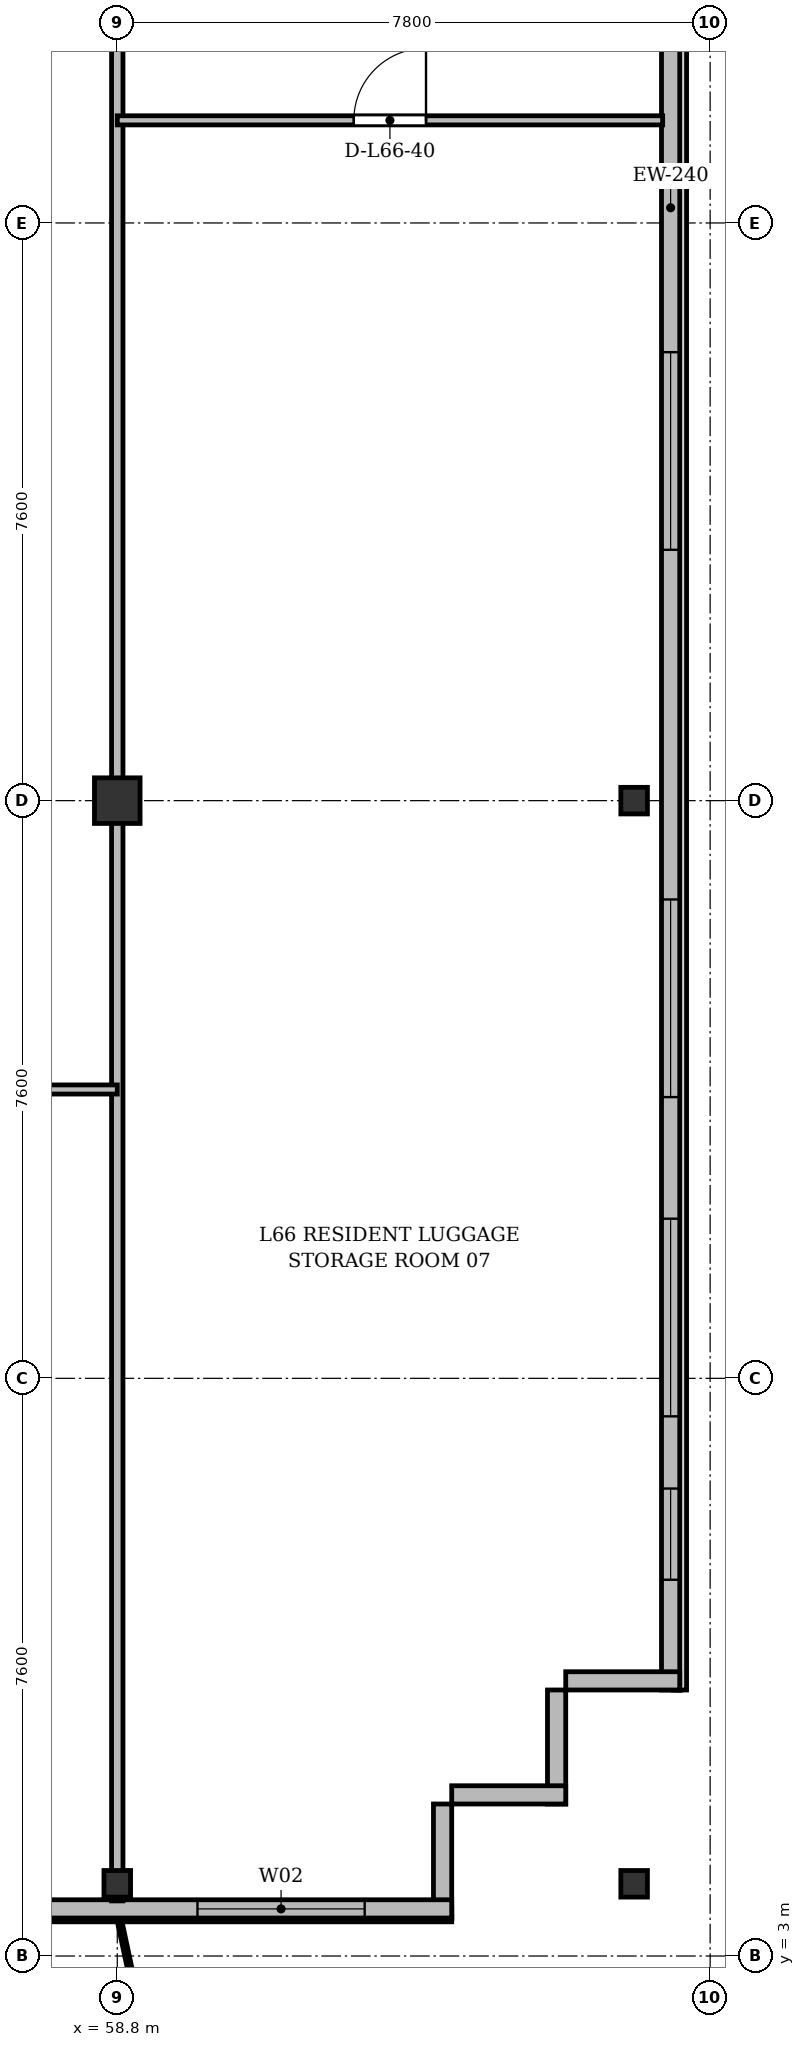
"""IFC4 building model, lengths in metres.
Left out: names, types, materials, properties, quantities, classifications, styles, units other than length and angle.
Written with IfcOpenShell. Run it as: python <this file> out.ifc"""

import sys

from ifc_helpers import new_model, si_unit, direction, frame, frame_2d, origin, origin_2d, place, context, subcontext, project, spatial, rectangle, i_section, extrude, source, transform, mapped, element, fill, save


model = new_model("IFC4")
c1 = context("Model", 3, precision=1e-05, world=origin(), true_north=direction((0.0, 1.0)))
c2 = subcontext(c1, "Body", "Model", "MODEL_VIEW")
j1 = project(units=[si_unit("LENGTHUNIT", "METRE"), si_unit("PLANEANGLEUNIT", "RADIAN")], contexts=[c1])
p1 = place(None, origin())
s1 = spatial("IfcSite", under=j1, at=p1, CompositionType="ELEMENT")
p2 = place(p1, origin())
s2 = spatial("IfcBuilding", under=s1, at=p2, CompositionType="ELEMENT")
p3 = place(p2, frame((0.0, 0.0, 255.9)))
s3 = spatial("IfcBuildingStorey", under=s2, at=p3, CompositionType="ELEMENT", Elevation=255.9)
m1 = source(origin(), c2, "Body", "SweptSolid", [
    extrude(i_section(OverallWidth=0.35, OverallDepth=0.35, WebThickness=0.018, FlangeThickness=0.028, at=origin_2d()), origin(), (0.0, 0.0, 1.0), 3.6),
])
p4 = place(p3, frame((58.8, 3.95, 0.0), z_axis=(0.0, 0.0, 1.0), x_axis=(1.0, 0.0, 0.0)))
e1 = element("IfcColumn", 1, at=p4, inside=s3, PredefinedType="COLUMN", context=c2, shape_type="MappedRepresentation", body=[
    mapped(m1, transform((0.0, 0.0, 0.0), x_axis=(1.0, 0.0, 0.0), y_axis=(0.0, 1.0, 0.0), z_axis=(0.0, 0.0, 1.0), scale=1.0)),
])
m2 = source(origin(), c2, "Body", "SweptSolid", [
    extrude(rectangle(XDim=0.6, YDim=0.6, at=origin_2d()), origin(), (0.0, 0.0, 1.0), 3.6),
])
p5 = place(p3, frame((58.8, 18.2, 0.0), z_axis=(0.0, 0.0, 1.0), x_axis=(1.0, 0.0, 0.0)))
e2 = element("IfcColumn", 2, at=p5, inside=s3, PredefinedType="COLUMN", context=c2, shape_type="MappedRepresentation", body=[
    mapped(m2, transform((0.0, 0.0, 0.0), x_axis=(1.0, 0.0, 0.0), y_axis=(0.0, 1.0, 0.0), z_axis=(0.0, 0.0, 1.0), scale=1.0)),
])
for number, where, z_axis, x_axis in (
    (3, (65.6, 3.95, 0.0), (0.0, 0.0, 1.0), (1.0, 0.0, 0.0)),
    (4, (65.6, 18.2, 0.0), (0.0, 0.0, 1.0), (1.0, 0.0, 0.0)),
):
    element("IfcColumn", number, at=place(p3, frame(where, z_axis=z_axis, x_axis=x_axis)), inside=s3, PredefinedType="COLUMN", context=c2, shape_type="MappedRepresentation", body=[
        mapped(m1, transform((0.0, 0.0, 0.0), x_axis=(1.0, 0.0, 0.0), y_axis=(0.0, 1.0, 0.0), z_axis=(0.0, 0.0, 1.0), scale=1.0)),
    ])
p6 = place(p3, frame((66.08, 45.5, 0.0), z_axis=(0.0, 0.0, 1.0), x_axis=(0.0, -1.0, 0.0)))
e5 = element("IfcWall", 5, at=p6, inside=s3, PredefinedType="SOLIDWALL", context=c2, shape_type="SweptSolid", body=[
    extrude(rectangle(XDim=39.0, YDim=0.24, at=frame_2d((19.5, 0.0))), origin(), (0.0, 0.0, 1.0), 3.37),
])
p7 = place(p6, frame((36.35, 0.0, 0.92)))
e6 = element("IfcOpeningElement", 6, at=p7, cuts=e5, PredefinedType="OPENING", context=c2, shape_type="SweptSolid", body=[
    extrude(rectangle(XDim=1.2, YDim=1.65, at=frame_2d((0.6, 0.825))), frame((0.0, 0.13, 0.0), z_axis=(0.0, -1.0, 0.0), x_axis=(1.0, 0.0, 0.0)), (0.0, 0.0, 1.0), 0.26),
])
p8 = place(p6, frame((32.8, 0.0, 0.92)))
e7 = element("IfcOpeningElement", 7, at=p8, cuts=e5, PredefinedType="OPENING", context=c2, shape_type="SweptSolid", body=[
    extrude(rectangle(XDim=2.6, YDim=1.9, at=frame_2d((1.3, 0.95))), frame((0.0, 0.13, 0.0), z_axis=(0.0, -1.0, 0.0), x_axis=(1.0, 0.0, 0.0)), (0.0, 0.0, 1.0), 0.26),
])
p9 = place(p6, frame((28.6, 0.0, 0.92)))
e8 = element("IfcOpeningElement", 8, at=p9, cuts=e5, PredefinedType="OPENING", context=c2, shape_type="SweptSolid", body=[
    extrude(rectangle(XDim=2.6, YDim=1.9, at=frame_2d((1.3, 0.95))), frame((0.0, 0.13, 0.0), z_axis=(0.0, -1.0, 0.0), x_axis=(1.0, 0.0, 0.0)), (0.0, 0.0, 1.0), 0.26),
])
p10 = place(p6, frame((21.4, 0.0, 0.92)))
e9 = element("IfcOpeningElement", 9, at=p10, cuts=e5, PredefinedType="OPENING", context=c2, shape_type="SweptSolid", body=[
    extrude(rectangle(XDim=2.6, YDim=1.9, at=frame_2d((1.3, 0.95))), frame((0.0, 0.13, 0.0), z_axis=(0.0, -1.0, 0.0), x_axis=(1.0, 0.0, 0.0)), (0.0, 0.0, 1.0), 0.26),
])
p11 = place(p6, frame((7.4, 0.0, 0.92)))
e10 = element("IfcOpeningElement", 10, at=p11, cuts=e5, PredefinedType="OPENING", context=c2, shape_type="SweptSolid", body=[
    extrude(rectangle(XDim=2.6, YDim=1.9, at=frame_2d((1.3, 0.95))), frame((0.0, 0.13, 0.0), z_axis=(0.0, -1.0, 0.0), x_axis=(1.0, 0.0, 0.0)), (0.0, 0.0, 1.0), 0.26),
])
p12 = place(p6, frame((4.5, 0.0, 0.92)))
e11 = element("IfcOpeningElement", 11, at=p12, cuts=e5, PredefinedType="OPENING", context=c2, shape_type="SweptSolid", body=[
    extrude(rectangle(XDim=1.2, YDim=1.65, at=frame_2d((0.6, 0.825))), frame((0.0, 0.13, 0.0), z_axis=(0.0, -1.0, 0.0), x_axis=(1.0, 0.0, 0.0)), (0.0, 0.0, 1.0), 0.26),
])
p13 = place(p6, frame((1.15, 0.0, 0.92)))
e12 = element("IfcOpeningElement", 12, at=p13, cuts=e5, PredefinedType="OPENING", context=c2, shape_type="SweptSolid", body=[
    extrude(rectangle(XDim=1.2, YDim=1.65, at=frame_2d((0.6, 0.825))), frame((0.0, 0.13, 0.0), z_axis=(0.0, -1.0, 0.0), x_axis=(1.0, 0.0, 0.0)), (0.0, 0.0, 1.0), 0.26),
])
p14 = place(p3, frame((66.2, 6.62, 0.0), z_axis=(0.0, 0.0, 1.0), x_axis=(-1.0, 0.0, 0.0)))
e13 = element("IfcWall", 13, at=p14, inside=s3, PredefinedType="SOLIDWALL", context=c2, shape_type="SweptSolid", body=[
    extrude(rectangle(XDim=1.5, YDim=0.24, at=frame_2d((0.75, 0.0))), origin(), (0.0, 0.0, 1.0), 2.87),
])
for number, where, z_axis, x_axis in (
    (14, (64.58, 6.5, 0.0), (0.0, 0.0, 1.0), (0.0, -1.0, 0.0)),
    (15, (64.7, 5.12, 0.0), (0.0, 0.0, 1.0), (-1.0, 0.0, 0.0)),
):
    element("IfcWall", number, at=place(p3, frame(where, z_axis=z_axis, x_axis=x_axis)), inside=s3, PredefinedType="SOLIDWALL", context=c2, shape_type="SweptSolid", body=[
        extrude(rectangle(XDim=1.5, YDim=0.24, at=frame_2d((0.75, 0.0))), origin(), (0.0, 0.0, 1.0), 3.37),
    ])
p15 = place(p3, frame((63.08, 5.0, 0.0), z_axis=(0.0, 0.0, 1.0), x_axis=(0.0, -1.0, 0.0)))
e16 = element("IfcWall", 16, at=p15, inside=s3, PredefinedType="SOLIDWALL", context=c2, shape_type="SweptSolid", body=[
    extrude(rectangle(XDim=1.5, YDim=0.24, at=frame_2d((0.75, 0.0))), origin(), (0.0, 0.0, 1.0), 2.92),
])
p16 = place(p3, frame((63.2, 3.62, 0.0), z_axis=(0.0, 0.0, 1.0), x_axis=(-1.0, 0.0, 0.0)))
e17 = element("IfcWall", 17, at=p16, inside=s3, PredefinedType="SOLIDWALL", context=c2, shape_type="SweptSolid", body=[
    extrude(rectangle(XDim=52.0, YDim=0.24, at=frame_2d((26.0, 0.0))), origin(), (0.0, 0.0, 1.0), 3.37),
])
p17 = place(p16, frame((1.145, 0.0, 0.9)))
e18 = element("IfcOpeningElement", 18, at=p17, cuts=e17, PredefinedType="OPENING", context=c2, shape_type="SweptSolid", body=[
    extrude(rectangle(XDim=2.2, YDim=1.8, at=frame_2d((1.1, 0.9))), frame((0.0, 0.13, 0.0), z_axis=(0.0, -1.0, 0.0), x_axis=(1.0, 0.0, 0.0)), (0.0, 0.0, 1.0), 0.26),
])
p18 = place(p16, frame((7.55, 0.0, 0.9)))
e19 = element("IfcOpeningElement", 19, at=p18, cuts=e17, PredefinedType="OPENING", context=c2, shape_type="SweptSolid", body=[
    extrude(rectangle(XDim=1.5, YDim=1.75, at=frame_2d((0.75, 0.875))), frame((0.0, 0.13, 0.0), z_axis=(0.0, -1.0, 0.0), x_axis=(1.0, 0.0, 0.0)), (0.0, 0.0, 1.0), 0.26),
])
p19 = place(p16, frame((14.017, 0.0, 0.0)))
e20 = element("IfcOpeningElement", 20, at=p19, cuts=e17, PredefinedType="OPENING", context=c2, shape_type="SweptSolid", body=[
    extrude(rectangle(XDim=1.2, YDim=2.2, at=frame_2d((0.6, 1.1))), frame((0.0, 0.13, 0.0), z_axis=(0.0, -1.0, 0.0), x_axis=(1.0, 0.0, 0.0)), (0.0, 0.0, 1.0), 0.26),
])
p20 = place(p16, frame((25.175, 0.0, 0.9)))
e21 = element("IfcOpeningElement", 21, at=p20, cuts=e17, PredefinedType="OPENING", context=c2, shape_type="SweptSolid", body=[
    extrude(rectangle(XDim=1.65, YDim=1.85, at=frame_2d((0.825, 0.925))), frame((0.0, 0.13, 0.0), z_axis=(0.0, -1.0, 0.0), x_axis=(1.0, 0.0, 0.0)), (0.0, 0.0, 1.0), 0.26),
])
p21 = place(p16, frame((35.3, 0.0, 0.9)))
e22 = element("IfcOpeningElement", 22, at=p21, cuts=e17, PredefinedType="OPENING", context=c2, shape_type="SweptSolid", body=[
    extrude(rectangle(XDim=1.8, YDim=1.8, at=frame_2d((0.9, 0.9))), frame((0.0, 0.13, 0.0), z_axis=(0.0, -1.0, 0.0), x_axis=(1.0, 0.0, 0.0)), (0.0, 0.0, 1.0), 0.26),
])
p22 = place(p16, frame((45.302, 0.0, 0.0)))
e23 = element("IfcOpeningElement", 23, at=p22, cuts=e17, PredefinedType="OPENING", context=c2, shape_type="SweptSolid", body=[
    extrude(rectangle(XDim=1.2, YDim=2.2, at=frame_2d((0.6, 1.1))), frame((0.0, 0.13, 0.0), z_axis=(0.0, -1.0, 0.0), x_axis=(1.0, 0.0, 0.0)), (0.0, 0.0, 1.0), 0.26),
])
p23 = place(p16, frame((49.005, 0.0, 0.9)))
e24 = element("IfcOpeningElement", 24, at=p23, cuts=e17, PredefinedType="OPENING", context=c2, shape_type="SweptSolid", body=[
    extrude(rectangle(XDim=1.5, YDim=1.75, at=frame_2d((0.75, 0.875))), frame((0.0, 0.13, 0.0), z_axis=(0.0, -1.0, 0.0), x_axis=(1.0, 0.0, 0.0)), (0.0, 0.0, 1.0), 0.26),
])
p24 = place(p3, frame((58.8, 3.725, 0.0), z_axis=(0.0, 0.0, 1.0), x_axis=(0.0, 1.0, 0.0)))
e25 = element("IfcWall", 25, at=p24, inside=s3, PredefinedType="PARTITIONING", context=c2, shape_type="SweptSolid", body=[
    extrude(rectangle(XDim=27.275, YDim=0.15, at=frame_2d((13.637, 0.0))), origin(), (0.0, 0.0, 1.0), 2.87),
])
p25 = place(p3, frame((51.0, 14.4, 0.0), z_axis=(0.0, 0.0, 1.0), x_axis=(1.0, 0.0, 0.0)))
e26 = element("IfcWall", 26, at=p25, inside=s3, PredefinedType="PARTITIONING", context=c2, shape_type="SweptSolid", body=[
    extrude(rectangle(XDim=7.8, YDim=0.12, at=frame_2d((3.9, 0.0))), origin(), (0.0, 0.0, 1.0), 2.87),
])
p26 = place(p25, frame((3.333, 0.0, 0.0)))
e27 = element("IfcOpeningElement", 27, at=p26, cuts=e26, PredefinedType="OPENING", context=c2, shape_type="SweptSolid", body=[
    extrude(rectangle(XDim=0.95, YDim=2.15, at=frame_2d((0.475, 1.075))), frame((0.0, 0.07, 0.0), z_axis=(0.0, -1.0, 0.0), x_axis=(1.0, 0.0, 0.0)), (0.0, 0.0, 1.0), 0.14),
])
p27 = place(p3, frame((58.8, 27.15, 0.0), z_axis=(0.0, 0.0, 1.0), x_axis=(1.0, 0.0, 0.0)))
e28 = element("IfcWall", 28, at=p27, inside=s3, PredefinedType="PARTITIONING", context=c2, shape_type="SweptSolid", body=[
    extrude(rectangle(XDim=7.175, YDim=0.12, at=frame_2d((3.587, 0.0))), origin(), (0.0, 0.0, 1.0), 2.87),
])
p28 = place(p27, frame((3.112, 0.0, 0.0)))
e29 = element("IfcOpeningElement", 29, at=p28, cuts=e28, PredefinedType="OPENING", context=c2, shape_type="SweptSolid", body=[
    extrude(rectangle(XDim=0.95, YDim=2.15, at=frame_2d((0.475, 1.075))), frame((0.0, 0.07, 0.0), z_axis=(0.0, -1.0, 0.0), x_axis=(1.0, 0.0, 0.0)), (0.0, 0.0, 1.0), 0.14),
])
m3 = source(origin(), c2, "Body", "SweptSolid", [
    extrude(rectangle(XDim=1.2, YDim=1.65, at=frame_2d((0.6, 0.825))), frame((0.0, 0.03, 0.0), z_axis=(0.0, -1.0, 0.0), x_axis=(1.0, 0.0, 0.0)), (0.0, 0.0, 1.0), 0.06),
])
p29 = place(p7, origin())
e30 = element("IfcWindow", 30, at=p29, inside=s3, PartitioningType="SINGLE_PANEL", PredefinedType="WINDOW", context=c2, shape_type="MappedRepresentation", body=[
    mapped(m3, transform((0.0, 0.0, 0.0), x_axis=(1.0, 0.0, 0.0), y_axis=(0.0, 1.0, 0.0), z_axis=(0.0, 0.0, 1.0), scale=1.0)),
])
fill(e6, e30)
m4 = source(origin(), c2, "Body", "SweptSolid", [
    extrude(rectangle(XDim=2.6, YDim=1.9, at=frame_2d((1.3, 0.95))), frame((0.0, 0.03, 0.0), z_axis=(0.0, -1.0, 0.0), x_axis=(1.0, 0.0, 0.0)), (0.0, 0.0, 1.0), 0.06),
])
p30 = place(p8, origin())
e31 = element("IfcWindow", 31, at=p30, inside=s3, PartitioningType="SINGLE_PANEL", PredefinedType="WINDOW", context=c2, shape_type="MappedRepresentation", body=[
    mapped(m4, transform((0.0, 0.0, 0.0), x_axis=(1.0, 0.0, 0.0), y_axis=(0.0, 1.0, 0.0), z_axis=(0.0, 0.0, 1.0), scale=1.0)),
])
fill(e7, e31)
p31 = place(p9, origin())
e32 = element("IfcWindow", 32, at=p31, inside=s3, PartitioningType="SINGLE_PANEL", PredefinedType="WINDOW", context=c2, shape_type="MappedRepresentation", body=[
    mapped(m4, transform((0.0, 0.0, 0.0), x_axis=(1.0, 0.0, 0.0), y_axis=(0.0, 1.0, 0.0), z_axis=(0.0, 0.0, 1.0), scale=1.0)),
])
fill(e8, e32)
p32 = place(p10, origin())
e33 = element("IfcWindow", 33, at=p32, inside=s3, PartitioningType="SINGLE_PANEL", PredefinedType="WINDOW", context=c2, shape_type="MappedRepresentation", body=[
    mapped(m4, transform((0.0, 0.0, 0.0), x_axis=(1.0, 0.0, 0.0), y_axis=(0.0, 1.0, 0.0), z_axis=(0.0, 0.0, 1.0), scale=1.0)),
])
fill(e9, e33)
m5 = source(origin(), c2, "Body", "SweptSolid", [
    extrude(rectangle(XDim=2.2, YDim=1.8, at=frame_2d((1.1, 0.9))), frame((0.0, 0.03, 0.0), z_axis=(0.0, -1.0, 0.0), x_axis=(1.0, 0.0, 0.0)), (0.0, 0.0, 1.0), 0.06),
])
p33 = place(p17, origin())
e34 = element("IfcWindow", 34, at=p33, inside=s3, PartitioningType="SINGLE_PANEL", PredefinedType="WINDOW", context=c2, shape_type="MappedRepresentation", body=[
    mapped(m5, transform((0.0, 0.0, 0.0), x_axis=(1.0, 0.0, 0.0), y_axis=(0.0, 1.0, 0.0), z_axis=(0.0, 0.0, 1.0), scale=1.0)),
])
fill(e18, e34)
m6 = source(origin(), c2, "Body", "SweptSolid", [
    extrude(rectangle(XDim=0.95, YDim=2.15, at=frame_2d((0.475, 1.075))), frame((0.0, 0.025, 0.0), z_axis=(0.0, -1.0, 0.0), x_axis=(1.0, 0.0, 0.0)), (0.0, 0.0, 1.0), 0.05),
])
p34 = place(p28, origin())
e35 = element("IfcDoor", 35, at=p34, inside=s3, OperationType="SINGLE_SWING_RIGHT", PredefinedType="DOOR", context=c2, shape_type="MappedRepresentation", body=[
    mapped(m6, transform((0.0, 0.0, 0.0), x_axis=(1.0, 0.0, 0.0), y_axis=(0.0, 1.0, 0.0), z_axis=(0.0, 0.0, 1.0), scale=1.0)),
])
fill(e29, e35)
save(model, sys.argv[1])
